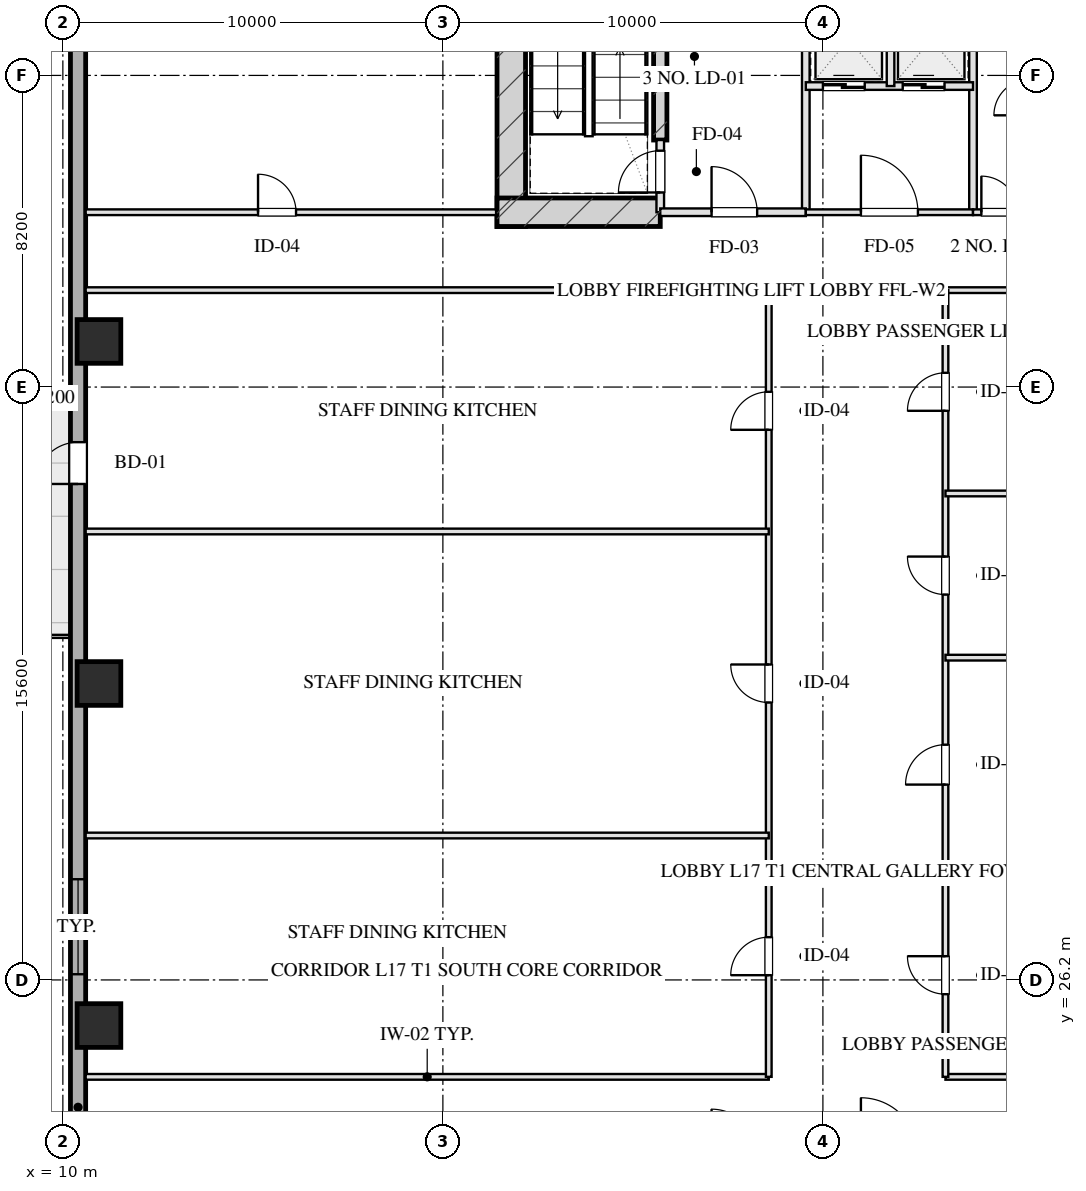
"""IFC4 building model, lengths in metres.
Left out: names, types, materials, properties, quantities, classifications, styles, units other than length and angle.
Written with IfcOpenShell. Run it as: python <this file> out.ifc"""

import sys

from ifc_helpers import new_model, si_unit, direction, frame, frame_2d, origin, origin_2d, place, context, subcontext, project, spatial, rectangle, hollow_rectangle, extrude, element, fill, save


model = new_model("IFC4")
c1 = context("Model", 3, precision=1e-05, world=origin(), true_north=direction((0.0, 1.0)))
c2 = subcontext(c1, "Body", "Model", "MODEL_VIEW")
j1 = project(units=[si_unit("LENGTHUNIT", "METRE"), si_unit("PLANEANGLEUNIT", "RADIAN")], contexts=[c1])
p1 = place(None, origin())
s1 = spatial("IfcSite", under=j1, at=p1, CompositionType="ELEMENT")
p2 = place(p1, origin())
s2 = spatial("IfcBuilding", under=s1, at=p2, CompositionType="ELEMENT")
p3 = place(p2, frame((0.0, 0.0, 71.3)))
s3 = spatial("IfcBuildingStorey", under=s2, at=p3, CompositionType="ELEMENT", Elevation=71.3)
p4 = place(p3, frame((21.8, 46.025, 0.0), z_axis=(0.0, 0.0, 1.0), x_axis=(0.0, 1.0, 0.0)))
e1 = element("IfcWall", 1, at=p4, inside=s3, PredefinedType="SHEAR", context=c2, shape_type="SweptSolid", body=[
    extrude(rectangle(XDim=9.63, YDim=0.75, at=frame_2d((4.815, 0.0))), origin(), (0.0, 0.0, 1.0), 3.45),
])
p5 = place(p3, frame((25.72, 48.3, 0.0), z_axis=(0.0, 0.0, 1.0), x_axis=(0.0, 1.0, 0.0)))
e2 = element("IfcWall", 2, at=p5, inside=s3, PredefinedType="SHEAR", context=c2, shape_type="SweptSolid", body=[
    extrude(rectangle(XDim=6.98, YDim=0.35, at=frame_2d((3.49, 0.0))), origin(), (0.0, 0.0, 1.0), 3.45),
])
p6 = place(p3, frame((21.425, 46.4, 0.0), z_axis=(0.0, 0.0, 1.0), x_axis=(1.0, 0.0, 0.0)))
e3 = element("IfcWall", 3, at=p6, inside=s3, PredefinedType="SHEAR", context=c2, shape_type="SweptSolid", body=[
    extrude(rectangle(XDim=4.295, YDim=0.75, at=frame_2d((2.147, 0.0))), origin(), (0.0, 0.0, 1.0), 3.45),
])
for number, where, z_axis, x_axis in (
    (4, (10.95, 25.0, 0.0), (0.0, 0.0, 1.0), (1.0, 0.0, 0.0)),
    (5, (10.95, 34.0, 0.0), (0.0, 0.0, 1.0), (1.0, 0.0, 0.0)),
    (6, (10.95, 43.0, 0.0), (0.0, 0.0, 1.0), (1.0, 0.0, 0.0)),
):
    element("IfcColumn", number, at=place(p3, frame(where, z_axis=z_axis, x_axis=x_axis)), inside=s3, PredefinedType="COLUMN", context=c2, shape_type="SweptSolid", body=[
        extrude(hollow_rectangle(XDim=1.15, YDim=1.15, WallThickness=0.04, at=origin_2d()), origin(), (0.0, 0.0, 1.0), 3.451),
    ])
p7 = place(p3, frame((10.4, 7.2, 0.0), z_axis=(0.0, 0.0, 1.0), x_axis=(0.0, 1.0, 0.0)))
e7 = element("IfcWall", 7, at=p7, inside=s3, PredefinedType="SOLIDWALL", context=c2, shape_type="SweptSolid", body=[
    extrude(rectangle(XDim=53.6, YDim=0.4, at=frame_2d((26.8, 0.0))), origin(), (0.0, 0.0, 1.0), 2.61),
])
p8 = place(p7, frame((19.15, 0.0, 0.75)))
e8 = element("IfcOpeningElement", 8, at=p8, cuts=e7, PredefinedType="OPENING", context=c2, shape_type="SweptSolid", body=[
    extrude(rectangle(XDim=2.5, YDim=1.46, at=frame_2d((1.25, 0.73))), frame((0.0, 0.21, 0.0), z_axis=(0.0, -1.0, 0.0), x_axis=(1.0, 0.0, 0.0)), (0.0, 0.0, 1.0), 0.42),
])
p9 = place(p7, frame((32.05, 0.0, 0.0)))
e9 = element("IfcOpeningElement", 9, at=p9, cuts=e7, PredefinedType="OPENING", context=c2, shape_type="SweptSolid", body=[
    extrude(rectangle(XDim=1.1, YDim=2.15, at=frame_2d((0.55, 1.075))), frame((0.0, 0.21, 0.0), z_axis=(0.0, -1.0, 0.0), x_axis=(1.0, 0.0, 0.0)), (0.0, 0.0, 1.0), 0.42),
])
p10 = place(p3, frame((25.72, 46.4, 0.0), z_axis=(0.0, 0.0, 1.0), x_axis=(0.0, 1.0, 0.0)))
e10 = element("IfcWall", 10, at=p10, inside=s3, PredefinedType="PARTITIONING", context=c2, shape_type="SweptSolid", body=[
    extrude(rectangle(XDim=1.9, YDim=0.2, at=frame_2d((0.95, 0.0))), origin(), (0.0, 0.0, 1.0), 3.175),
])
p11 = place(p10, frame((0.52, 0.0, 0.0)))
e11 = element("IfcOpeningElement", 11, at=p11, cuts=e10, PredefinedType="OPENING", context=c2, shape_type="SweptSolid", body=[
    extrude(rectangle(XDim=1.1, YDim=2.05, at=frame_2d((0.55, 1.025))), frame((0.0, 0.11, 0.0), z_axis=(0.0, -1.0, 0.0), x_axis=(1.0, 0.0, 0.0)), (0.0, 0.0, 1.0), 0.22),
])
p12 = place(p3, frame((29.55, 46.4, 0.0), z_axis=(0.0, 0.0, 1.0), x_axis=(0.0, 1.0, 0.0)))
e12 = element("IfcWall", 12, at=p12, inside=s3, PredefinedType="PARTITIONING", context=c2, shape_type="SweptSolid", body=[
    extrude(rectangle(XDim=8.43, YDim=0.2, at=frame_2d((4.215, 0.0))), origin(), (0.0, 0.0, 1.0), 3.175),
])
p13 = place(p3, frame((25.72, 46.4, 0.0), z_axis=(0.0, 0.0, 1.0), x_axis=(1.0, 0.0, 0.0)))
e13 = element("IfcWall", 13, at=p13, inside=s3, PredefinedType="PARTITIONING", context=c2, shape_type="SweptSolid", body=[
    extrude(rectangle(XDim=3.83, YDim=0.2, at=frame_2d((1.915, 0.0))), origin(), (0.0, 0.0, 1.0), 3.175),
])
p14 = place(p13, frame((1.35, 0.0, 0.0)))
e14 = element("IfcOpeningElement", 14, at=p14, cuts=e13, PredefinedType="OPENING", context=c2, shape_type="SweptSolid", body=[
    extrude(rectangle(XDim=1.2, YDim=2.05, at=frame_2d((0.6, 1.025))), frame((0.0, 0.11, 0.0), z_axis=(0.0, -1.0, 0.0), x_axis=(1.0, 0.0, 0.0)), (0.0, 0.0, 1.0), 0.22),
])
p15 = place(p3, frame((33.95, 46.4, 0.0), z_axis=(0.0, 0.0, 1.0), x_axis=(0.0, 1.0, 0.0)))
e15 = element("IfcWall", 15, at=p15, inside=s3, PredefinedType="PARTITIONING", context=c2, shape_type="SweptSolid", body=[
    extrude(rectangle(XDim=8.43, YDim=0.2, at=frame_2d((4.215, 0.0))), origin(), (0.0, 0.0, 1.0), 3.175),
])
p16 = place(p3, frame((29.55, 46.4, 0.0), z_axis=(0.0, 0.0, 1.0), x_axis=(1.0, 0.0, 0.0)))
e16 = element("IfcWall", 16, at=p16, inside=s3, PredefinedType="PARTITIONING", context=c2, shape_type="SweptSolid", body=[
    extrude(rectangle(XDim=4.4, YDim=0.15, at=frame_2d((2.2, 0.0))), origin(), (0.0, 0.0, 1.0), 3.175),
])
p17 = place(p16, frame((1.45, 0.0, 0.0)))
e17 = element("IfcOpeningElement", 17, at=p17, cuts=e16, PredefinedType="OPENING", context=c2, shape_type="SweptSolid", body=[
    extrude(rectangle(XDim=1.5, YDim=2.05, at=frame_2d((0.75, 1.025))), frame((0.0, 0.085, 0.0), z_axis=(0.0, -1.0, 0.0), x_axis=(1.0, 0.0, 0.0)), (0.0, 0.0, 1.0), 0.17),
])
p18 = place(p3, frame((29.55, 49.72, 0.0), z_axis=(0.0, 0.0, 1.0), x_axis=(1.0, 0.0, 0.0)))
e18 = element("IfcWall", 18, at=p18, inside=s3, PredefinedType="PARTITIONING", context=c2, shape_type="SweptSolid", body=[
    extrude(rectangle(XDim=4.4, YDim=0.2, at=frame_2d((2.2, 0.0))), origin(), (0.0, 0.0, 1.0), 3.175),
])
p19 = place(p18, frame((0.45, 0.0, 0.0)))
e19 = element("IfcOpeningElement", 19, at=p19, cuts=e18, PredefinedType="OPENING", context=c2, shape_type="SweptSolid", body=[
    extrude(rectangle(XDim=1.1, YDim=2.05, at=frame_2d((0.55, 1.025))), frame((0.0, 0.11, 0.0), z_axis=(0.0, -1.0, 0.0), x_axis=(1.0, 0.0, 0.0)), (0.0, 0.0, 1.0), 0.22),
])
p20 = place(p18, frame((2.55, 0.0, 0.0)))
e20 = element("IfcOpeningElement", 20, at=p20, cuts=e18, PredefinedType="OPENING", context=c2, shape_type="SweptSolid", body=[
    extrude(rectangle(XDim=1.1, YDim=2.05, at=frame_2d((0.55, 1.025))), frame((0.0, 0.11, 0.0), z_axis=(0.0, -1.0, 0.0), x_axis=(1.0, 0.0, 0.0)), (0.0, 0.0, 1.0), 0.22),
])
p21 = place(p3, frame((31.78, 49.72, 0.0), z_axis=(0.0, 0.0, 1.0), x_axis=(0.0, 1.0, 0.0)))
e21 = element("IfcWall", 21, at=p21, inside=s3, PredefinedType="PARTITIONING", context=c2, shape_type="SweptSolid", body=[
    extrude(rectangle(XDim=5.11, YDim=0.2, at=frame_2d((2.555, 0.0))), origin(), (0.0, 0.0, 1.0), 3.175),
])
p22 = place(p3, frame((33.95, 46.4, 0.0), z_axis=(0.0, 0.0, 1.0), x_axis=(1.0, 0.0, 0.0)))
e22 = element("IfcWall", 22, at=p22, inside=s3, PredefinedType="PARTITIONING", context=c2, shape_type="SweptSolid", body=[
    extrude(rectangle(XDim=3.8, YDim=0.15, at=frame_2d((1.9, 0.0))), origin(), (0.0, 0.0, 1.0), 3.175),
])
p23 = place(p22, frame((0.22, 0.0, 0.0)))
e23 = element("IfcOpeningElement", 23, at=p23, cuts=e22, PredefinedType="OPENING", context=c2, shape_type="SweptSolid", body=[
    extrude(rectangle(XDim=0.95, YDim=2.05, at=frame_2d((0.475, 1.025))), frame((0.0, 0.085, 0.0), z_axis=(0.0, -1.0, 0.0), x_axis=(1.0, 0.0, 0.0)), (0.0, 0.0, 1.0), 0.17),
])
p24 = place(p3, frame((10.6, 46.4, 0.0), z_axis=(0.0, 0.0, 1.0), x_axis=(1.0, 0.0, 0.0)))
e24 = element("IfcWall", 24, at=p24, inside=s3, PredefinedType="PARTITIONING", context=c2, shape_type="SweptSolid", body=[
    extrude(rectangle(XDim=10.8, YDim=0.15, at=frame_2d((5.4, 0.0))), origin(), (0.0, 0.0, 1.0), 3.175),
])
p25 = place(p24, frame((4.536, 0.0, 0.0)))
e25 = element("IfcOpeningElement", 25, at=p25, cuts=e24, PredefinedType="OPENING", context=c2, shape_type="SweptSolid", body=[
    extrude(rectangle(XDim=1.0, YDim=2.05, at=frame_2d((0.5, 1.025))), frame((0.0, 0.085, 0.0), z_axis=(0.0, -1.0, 0.0), x_axis=(1.0, 0.0, 0.0)), (0.0, 0.0, 1.0), 0.17),
])
p26 = place(p3, frame((10.6, 23.65, 0.0), z_axis=(0.0, 0.0, 1.0), x_axis=(1.0, 0.0, 0.0)))
e26 = element("IfcWall", 26, at=p26, inside=s3, PredefinedType="PARTITIONING", context=c2, shape_type="SweptSolid", body=[
    extrude(rectangle(XDim=17.975, YDim=0.15, at=frame_2d((8.987, 0.0))), origin(), (0.0, 0.0, 1.0), 3.175),
])
p27 = place(p3, frame((33.225, 23.65, 0.0), z_axis=(0.0, 0.0, 1.0), x_axis=(1.0, 0.0, 0.0)))
e27 = element("IfcWall", 27, at=p27, inside=s3, PredefinedType="PARTITIONING", context=c2, shape_type="SweptSolid", body=[
    extrude(rectangle(XDim=16.175, YDim=0.15, at=frame_2d((8.087, 0.0))), origin(), (0.0, 0.0, 1.0), 3.175),
])
p28 = place(p3, frame((10.6, 44.35, 0.0), z_axis=(0.0, 0.0, 1.0), x_axis=(1.0, 0.0, 0.0)))
e28 = element("IfcWall", 28, at=p28, inside=s3, PredefinedType="PARTITIONING", context=c2, shape_type="SweptSolid", body=[
    extrude(rectangle(XDim=17.975, YDim=0.15, at=frame_2d((8.987, 0.0))), origin(), (0.0, 0.0, 1.0), 3.175),
])
p29 = place(p3, frame((33.225, 44.35, 0.0), z_axis=(0.0, 0.0, 1.0), x_axis=(1.0, 0.0, 0.0)))
e29 = element("IfcWall", 29, at=p29, inside=s3, PredefinedType="PARTITIONING", context=c2, shape_type="SweptSolid", body=[
    extrude(rectangle(XDim=16.175, YDim=0.15, at=frame_2d((8.087, 0.0))), origin(), (0.0, 0.0, 1.0), 3.175),
])
p30 = place(p3, frame((28.575, 23.65, 0.0), z_axis=(0.0, 0.0, 1.0), x_axis=(0.0, 1.0, 0.0)))
e30 = element("IfcWall", 30, at=p30, inside=s3, PredefinedType="PARTITIONING", context=c2, shape_type="SweptSolid", body=[
    extrude(rectangle(XDim=20.7, YDim=0.15, at=frame_2d((10.35, 0.0))), origin(), (0.0, 0.0, 1.0), 3.175),
])
p31 = place(p30, frame((2.675, 0.0, 0.0)))
e31 = element("IfcOpeningElement", 31, at=p31, cuts=e30, PredefinedType="OPENING", context=c2, shape_type="SweptSolid", body=[
    extrude(rectangle(XDim=1.0, YDim=2.05, at=frame_2d((0.5, 1.025))), frame((0.0, 0.085, 0.0), z_axis=(0.0, -1.0, 0.0), x_axis=(1.0, 0.0, 0.0)), (0.0, 0.0, 1.0), 0.17),
])
p32 = place(p30, frame((9.85, 0.0, 0.0)))
e32 = element("IfcOpeningElement", 32, at=p32, cuts=e30, PredefinedType="OPENING", context=c2, shape_type="SweptSolid", body=[
    extrude(rectangle(XDim=1.0, YDim=2.05, at=frame_2d((0.5, 1.025))), frame((0.0, 0.085, 0.0), z_axis=(0.0, -1.0, 0.0), x_axis=(1.0, 0.0, 0.0)), (0.0, 0.0, 1.0), 0.17),
])
p33 = place(p30, frame((17.025, 0.0, 0.0)))
e33 = element("IfcOpeningElement", 33, at=p33, cuts=e30, PredefinedType="OPENING", context=c2, shape_type="SweptSolid", body=[
    extrude(rectangle(XDim=1.0, YDim=2.05, at=frame_2d((0.5, 1.025))), frame((0.0, 0.085, 0.0), z_axis=(0.0, -1.0, 0.0), x_axis=(1.0, 0.0, 0.0)), (0.0, 0.0, 1.0), 0.17),
])
p34 = place(p3, frame((33.225, 23.65, 0.0), z_axis=(0.0, 0.0, 1.0), x_axis=(0.0, 1.0, 0.0)))
e34 = element("IfcWall", 34, at=p34, inside=s3, PredefinedType="PARTITIONING", context=c2, shape_type="SweptSolid", body=[
    extrude(rectangle(XDim=20.7, YDim=0.15, at=frame_2d((10.35, 0.0))), origin(), (0.0, 0.0, 1.0), 3.175),
])
p35 = place(p34, frame((2.175, 0.0, 0.0)))
e35 = element("IfcOpeningElement", 35, at=p35, cuts=e34, PredefinedType="OPENING", context=c2, shape_type="SweptSolid", body=[
    extrude(rectangle(XDim=1.0, YDim=2.05, at=frame_2d((0.5, 1.025))), frame((0.0, 0.085, 0.0), z_axis=(0.0, -1.0, 0.0), x_axis=(1.0, 0.0, 0.0)), (0.0, 0.0, 1.0), 0.17),
])
p36 = place(p34, frame((7.69, 0.0, 0.0)))
e36 = element("IfcOpeningElement", 36, at=p36, cuts=e34, PredefinedType="OPENING", context=c2, shape_type="SweptSolid", body=[
    extrude(rectangle(XDim=1.05, YDim=2.05, at=frame_2d((0.525, 1.025))), frame((0.0, 0.085, 0.0), z_axis=(0.0, -1.0, 0.0), x_axis=(1.0, 0.0, 0.0)), (0.0, 0.0, 1.0), 0.17),
])
p37 = place(p34, frame((12.69, 0.0, 0.0)))
e37 = element("IfcOpeningElement", 37, at=p37, cuts=e34, PredefinedType="OPENING", context=c2, shape_type="SweptSolid", body=[
    extrude(rectangle(XDim=1.0, YDim=2.05, at=frame_2d((0.5, 1.025))), frame((0.0, 0.085, 0.0), z_axis=(0.0, -1.0, 0.0), x_axis=(1.0, 0.0, 0.0)), (0.0, 0.0, 1.0), 0.17),
])
p38 = place(p34, frame((17.525, 0.0, 0.0)))
e38 = element("IfcOpeningElement", 38, at=p38, cuts=e34, PredefinedType="OPENING", context=c2, shape_type="SweptSolid", body=[
    extrude(rectangle(XDim=1.0, YDim=2.05, at=frame_2d((0.5, 1.025))), frame((0.0, 0.085, 0.0), z_axis=(0.0, -1.0, 0.0), x_axis=(1.0, 0.0, 0.0)), (0.0, 0.0, 1.0), 0.17),
])
for number, where, z_axis, x_axis in (
    (39, (10.6, 30.0, 0.0), (0.0, 0.0, 1.0), (1.0, 0.0, 0.0)),
    (40, (10.6, 38.0, 0.0), (0.0, 0.0, 1.0), (1.0, 0.0, 0.0)),
):
    element("IfcWall", number, at=place(p3, frame(where, z_axis=z_axis, x_axis=x_axis)), inside=s3, PredefinedType="PARTITIONING", context=c2, shape_type="SweptSolid", body=[
        extrude(rectangle(XDim=17.975, YDim=0.15, at=frame_2d((8.987, 0.0))), origin(), (0.0, 0.0, 1.0), 3.175),
    ])
for number, where, z_axis, x_axis in (
    (41, (33.225, 29.0, 0.0), (0.0, 0.0, 1.0), (1.0, 0.0, 0.0)),
    (42, (33.225, 34.68, 0.0), (0.0, 0.0, 1.0), (1.0, 0.0, 0.0)),
    (43, (33.225, 39.0, 0.0), (0.0, 0.0, 1.0), (1.0, 0.0, 0.0)),
):
    element("IfcWall", number, at=place(p3, frame(where, z_axis=z_axis, x_axis=x_axis)), inside=s3, PredefinedType="PARTITIONING", context=c2, shape_type="SweptSolid", body=[
        extrude(rectangle(XDim=16.175, YDim=0.15, at=frame_2d((8.087, 0.0))), origin(), (0.0, 0.0, 1.0), 3.175),
    ])
p39 = place(p8, origin())
e44 = element("IfcWindow", 44, at=p39, inside=s3, PartitioningType="TRIPLE_PANEL_VERTICAL", PredefinedType="WINDOW", context=c2, shape_type="SweptSolid", body=[
    extrude(rectangle(XDim=2.5, YDim=1.46, at=frame_2d((1.25, 0.73))), frame((0.0, 0.03, 0.0), z_axis=(0.0, -1.0, 0.0), x_axis=(1.0, 0.0, 0.0)), (0.0, 0.0, 1.0), 0.06),
])
fill(e8, e44)
p40 = place(p9, origin())
e45 = element("IfcDoor", 45, at=p40, inside=s3, OperationType="SINGLE_SWING_LEFT", PredefinedType="DOOR", context=c2, shape_type="SweptSolid", body=[
    extrude(rectangle(XDim=1.1, YDim=2.15, at=frame_2d((0.55, 1.075))), frame((0.0, 0.025, 0.0), z_axis=(0.0, -1.0, 0.0), x_axis=(1.0, 0.0, 0.0)), (0.0, 0.0, 1.0), 0.05),
])
fill(e9, e45)
p41 = place(p11, origin())
e46 = element("IfcDoor", 46, at=p41, inside=s3, OperationType="SINGLE_SWING_LEFT", PredefinedType="DOOR", context=c2, shape_type="SweptSolid", body=[
    extrude(rectangle(XDim=1.1, YDim=2.05, at=frame_2d((0.55, 1.025))), frame((0.0, 0.025, 0.0), z_axis=(0.0, -1.0, 0.0), x_axis=(1.0, 0.0, 0.0)), (0.0, 0.0, 1.0), 0.05),
])
fill(e11, e46)
p42 = place(p14, origin())
e47 = element("IfcDoor", 47, at=p42, inside=s3, OperationType="SINGLE_SWING_LEFT", PredefinedType="DOOR", context=c2, shape_type="SweptSolid", body=[
    extrude(rectangle(XDim=1.2, YDim=2.05, at=frame_2d((0.6, 1.025))), frame((0.0, 0.025, 0.0), z_axis=(0.0, -1.0, 0.0), x_axis=(1.0, 0.0, 0.0)), (0.0, 0.0, 1.0), 0.05),
])
fill(e14, e47)
p43 = place(p17, origin())
e48 = element("IfcDoor", 48, at=p43, inside=s3, OperationType="SINGLE_SWING_LEFT", PredefinedType="DOOR", context=c2, shape_type="SweptSolid", body=[
    extrude(rectangle(XDim=1.5, YDim=2.05, at=frame_2d((0.75, 1.025))), frame((0.0, 0.025, 0.0), z_axis=(0.0, -1.0, 0.0), x_axis=(1.0, 0.0, 0.0)), (0.0, 0.0, 1.0), 0.05),
])
fill(e17, e48)
p44 = place(p19, origin())
e49 = element("IfcDoor", 49, at=p44, inside=s3, OperationType="DOUBLE_DOOR_SLIDING", PredefinedType="DOOR", context=c2, shape_type="SweptSolid", body=[
    extrude(rectangle(XDim=1.1, YDim=2.05, at=frame_2d((0.55, 1.025))), frame((0.0, 0.025, 0.0), z_axis=(0.0, -1.0, 0.0), x_axis=(1.0, 0.0, 0.0)), (0.0, 0.0, 1.0), 0.05),
])
fill(e19, e49)
p45 = place(p20, origin())
e50 = element("IfcDoor", 50, at=p45, inside=s3, OperationType="DOUBLE_DOOR_SLIDING", PredefinedType="DOOR", context=c2, shape_type="SweptSolid", body=[
    extrude(rectangle(XDim=1.1, YDim=2.05, at=frame_2d((0.55, 1.025))), frame((0.0, 0.025, 0.0), z_axis=(0.0, -1.0, 0.0), x_axis=(1.0, 0.0, 0.0)), (0.0, 0.0, 1.0), 0.05),
])
fill(e20, e50)
p46 = place(p23, origin())
e51 = element("IfcDoor", 51, at=p46, inside=s3, OperationType="SINGLE_SWING_LEFT", PredefinedType="DOOR", context=c2, shape_type="SweptSolid", body=[
    extrude(rectangle(XDim=0.95, YDim=2.05, at=frame_2d((0.475, 1.025))), frame((0.0, 0.025, 0.0), z_axis=(0.0, -1.0, 0.0), x_axis=(1.0, 0.0, 0.0)), (0.0, 0.0, 1.0), 0.05),
])
fill(e23, e51)
p47 = place(p25, origin())
e52 = element("IfcDoor", 52, at=p47, inside=s3, OperationType="SINGLE_SWING_LEFT", PredefinedType="DOOR", context=c2, shape_type="SweptSolid", body=[
    extrude(rectangle(XDim=1.0, YDim=2.05, at=frame_2d((0.5, 1.025))), frame((0.0, 0.025, 0.0), z_axis=(0.0, -1.0, 0.0), x_axis=(1.0, 0.0, 0.0)), (0.0, 0.0, 1.0), 0.05),
])
fill(e25, e52)
p48 = place(p31, origin())
e53 = element("IfcDoor", 53, at=p48, inside=s3, OperationType="SINGLE_SWING_LEFT", PredefinedType="DOOR", context=c2, shape_type="SweptSolid", body=[
    extrude(rectangle(XDim=1.0, YDim=2.05, at=frame_2d((0.5, 1.025))), frame((0.0, 0.025, 0.0), z_axis=(0.0, -1.0, 0.0), x_axis=(1.0, 0.0, 0.0)), (0.0, 0.0, 1.0), 0.05),
])
fill(e31, e53)
p49 = place(p32, origin())
e54 = element("IfcDoor", 54, at=p49, inside=s3, OperationType="SINGLE_SWING_RIGHT", PredefinedType="DOOR", context=c2, shape_type="SweptSolid", body=[
    extrude(rectangle(XDim=1.0, YDim=2.05, at=frame_2d((0.5, 1.025))), frame((0.0, 0.025, 0.0), z_axis=(0.0, -1.0, 0.0), x_axis=(1.0, 0.0, 0.0)), (0.0, 0.0, 1.0), 0.05),
])
fill(e32, e54)
p50 = place(p33, origin())
e55 = element("IfcDoor", 55, at=p50, inside=s3, OperationType="SINGLE_SWING_LEFT", PredefinedType="DOOR", context=c2, shape_type="SweptSolid", body=[
    extrude(rectangle(XDim=1.0, YDim=2.05, at=frame_2d((0.5, 1.025))), frame((0.0, 0.025, 0.0), z_axis=(0.0, -1.0, 0.0), x_axis=(1.0, 0.0, 0.0)), (0.0, 0.0, 1.0), 0.05),
])
fill(e33, e55)
p51 = place(p35, origin())
e56 = element("IfcDoor", 56, at=p51, inside=s3, OperationType="SINGLE_SWING_RIGHT", PredefinedType="DOOR", context=c2, shape_type="SweptSolid", body=[
    extrude(rectangle(XDim=1.0, YDim=2.05, at=frame_2d((0.5, 1.025))), frame((0.0, 0.025, 0.0), z_axis=(0.0, -1.0, 0.0), x_axis=(1.0, 0.0, 0.0)), (0.0, 0.0, 1.0), 0.05),
])
fill(e35, e56)
p52 = place(p36, origin())
e57 = element("IfcDoor", 57, at=p52, inside=s3, OperationType="SINGLE_SWING_LEFT", PredefinedType="DOOR", context=c2, shape_type="SweptSolid", body=[
    extrude(rectangle(XDim=1.05, YDim=2.05, at=frame_2d((0.525, 1.025))), frame((0.0, 0.025, 0.0), z_axis=(0.0, -1.0, 0.0), x_axis=(1.0, 0.0, 0.0)), (0.0, 0.0, 1.0), 0.05),
])
fill(e36, e57)
p53 = place(p37, origin())
e58 = element("IfcDoor", 58, at=p53, inside=s3, OperationType="SINGLE_SWING_RIGHT", PredefinedType="DOOR", context=c2, shape_type="SweptSolid", body=[
    extrude(rectangle(XDim=1.0, YDim=2.05, at=frame_2d((0.5, 1.025))), frame((0.0, 0.025, 0.0), z_axis=(0.0, -1.0, 0.0), x_axis=(1.0, 0.0, 0.0)), (0.0, 0.0, 1.0), 0.05),
])
fill(e37, e58)
p54 = place(p38, origin())
e59 = element("IfcDoor", 59, at=p54, inside=s3, OperationType="SINGLE_SWING_LEFT", PredefinedType="DOOR", context=c2, shape_type="SweptSolid", body=[
    extrude(rectangle(XDim=1.0, YDim=2.05, at=frame_2d((0.5, 1.025))), frame((0.0, 0.025, 0.0), z_axis=(0.0, -1.0, 0.0), x_axis=(1.0, 0.0, 0.0)), (0.0, 0.0, 1.0), 0.05),
])
fill(e38, e59)
save(model, sys.argv[1])
